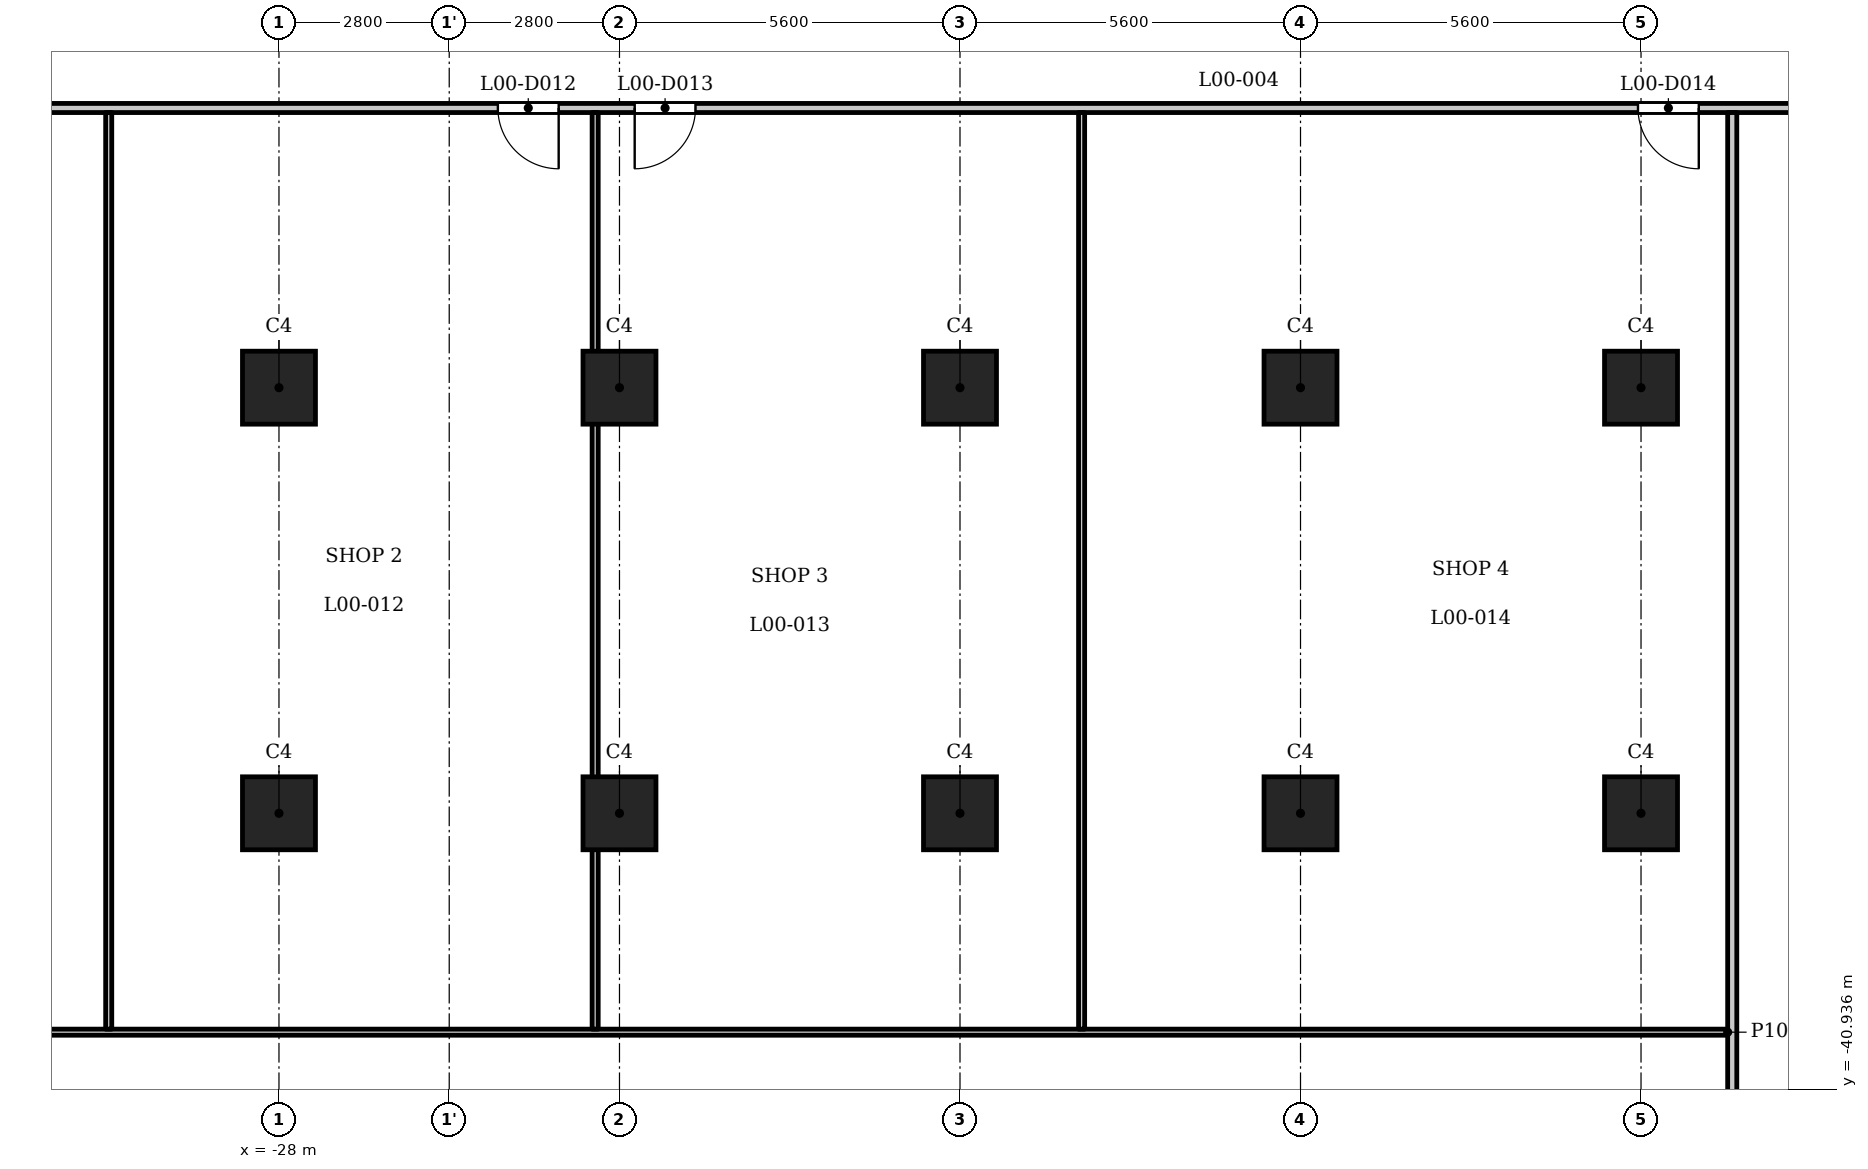
"""IFC4 building model, lengths in metres.
Left out: names, types, materials, properties, quantities, classifications, styles, units other than length and angle.
Written with IfcOpenShell. Run it as: python <this file> out.ifc"""

import sys

from ifc_helpers import new_model, si_unit, direction, frame, frame_2d, origin, origin_2d, place, context, subcontext, project, spatial, rectangle, circle, extrude, element, fill, save


model = new_model("IFC4")
c1 = context("Model", 3, precision=1e-05, world=origin(), true_north=direction((0.0, 1.0)))
c2 = subcontext(c1, "Body", "Model", "MODEL_VIEW")
j1 = project(units=[si_unit("LENGTHUNIT", "METRE"), si_unit("PLANEANGLEUNIT", "RADIAN")], contexts=[c1])
p1 = place(None, origin())
s1 = spatial("IfcSite", under=j1, at=p1, CompositionType="ELEMENT")
p2 = place(p1, origin())
s2 = spatial("IfcBuilding", under=s1, at=p2, CompositionType="ELEMENT")
p3 = place(p2, origin())
s3 = spatial("IfcBuildingStorey", under=s2, at=p3, CompositionType="ELEMENT", Elevation=0.0)
for number, where, z_axis, x_axis in (
    (1, (-28.0, -29.4, 0.0), (0.0, 0.0, 1.0), (1.0, 0.0, 0.0)),
    (2, (-22.4, -29.4, 0.0), (0.0, 0.0, 1.0), (1.0, 0.0, 0.0)),
    (3, (-16.8, -29.4, 0.0), (0.0, 0.0, 1.0), (1.0, 0.0, 0.0)),
    (4, (-11.2, -29.4, 0.0), (0.0, 0.0, 1.0), (1.0, 0.0, 0.0)),
    (5, (-5.6, -29.4, 0.0), (0.0, 0.0, 1.0), (1.0, 0.0, 0.0)),
    (6, (-28.0, -36.4, 0.0), (0.0, 0.0, 1.0), (1.0, 0.0, 0.0)),
    (7, (-22.4, -36.4, 0.0), (0.0, 0.0, 1.0), (1.0, 0.0, 0.0)),
    (8, (-16.8, -36.4, 0.0), (0.0, 0.0, 1.0), (1.0, 0.0, 0.0)),
    (9, (-11.2, -36.4, 0.0), (0.0, 0.0, 1.0), (1.0, 0.0, 0.0)),
    (10, (-5.6, -36.4, 0.0), (0.0, 0.0, 1.0), (1.0, 0.0, 0.0)),
):
    element("IfcColumn", number, at=place(p3, frame(where, z_axis=z_axis, x_axis=x_axis)), inside=s3, PredefinedType="COLUMN", context=c2, shape_type="SweptSolid", body=[
        extrude(circle(Radius=0.6, at=origin_2d()), origin(), (0.0, 0.0, 1.0), 6.5),
    ])
p4 = place(p3, frame((-44.618, -40.0, 0.0), z_axis=(0.0, 0.0, 1.0), x_axis=(1.0, 0.0, 0.0)))
e11 = element("IfcWall", 11, at=p4, inside=s3, PredefinedType="PARTITIONING", context=c2, shape_type="SweptSolid", body=[
    extrude(rectangle(XDim=40.443, YDim=0.1, at=frame_2d((20.221, 0.0))), origin(), (0.0, 0.0, 1.0), 6.15),
])
p5 = place(p3, frame((-37.0, -24.8, 0.0), z_axis=(0.0, 0.0, 1.0), x_axis=(1.0, 0.0, 0.0)))
e12 = element("IfcWall", 12, at=p5, inside=s3, PredefinedType="PARTITIONING", context=c2, shape_type="SweptSolid", body=[
    extrude(rectangle(XDim=34.95, YDim=0.15, at=frame_2d((17.475, 0.0))), origin(), (0.0, 0.0, 1.0), 6.15),
])
p6 = place(p5, frame((0.65, 0.0, 0.0)))
e13 = element("IfcOpeningElement", 13, at=p6, cuts=e12, PredefinedType="OPENING", context=c2, shape_type="SweptSolid", body=[
    extrude(rectangle(XDim=1.0, YDim=2.1, at=frame_2d((0.5, 1.05))), frame((0.0, 0.085, 0.0), z_axis=(0.0, -1.0, 0.0), x_axis=(1.0, 0.0, 0.0)), (0.0, 0.0, 1.0), 0.17),
])
p7 = place(p5, frame((12.6, 0.0, 0.0)))
e14 = element("IfcOpeningElement", 14, at=p7, cuts=e12, PredefinedType="OPENING", context=c2, shape_type="SweptSolid", body=[
    extrude(rectangle(XDim=1.0, YDim=2.1, at=frame_2d((0.5, 1.05))), frame((0.0, 0.085, 0.0), z_axis=(0.0, -1.0, 0.0), x_axis=(1.0, 0.0, 0.0)), (0.0, 0.0, 1.0), 0.17),
])
p8 = place(p5, frame((14.85, 0.0, 0.0)))
e15 = element("IfcOpeningElement", 15, at=p8, cuts=e12, PredefinedType="OPENING", context=c2, shape_type="SweptSolid", body=[
    extrude(rectangle(XDim=1.0, YDim=2.1, at=frame_2d((0.5, 1.05))), frame((0.0, 0.085, 0.0), z_axis=(0.0, -1.0, 0.0), x_axis=(1.0, 0.0, 0.0)), (0.0, 0.0, 1.0), 0.17),
])
p9 = place(p5, frame((31.35, 0.0, 0.0)))
e16 = element("IfcOpeningElement", 16, at=p9, cuts=e12, PredefinedType="OPENING", context=c2, shape_type="SweptSolid", body=[
    extrude(rectangle(XDim=1.0, YDim=2.1, at=frame_2d((0.5, 1.05))), frame((0.0, 0.085, 0.0), z_axis=(0.0, -1.0, 0.0), x_axis=(1.0, 0.0, 0.0)), (0.0, 0.0, 1.0), 0.17),
])
for number, where, z_axis, x_axis in (
    (17, (-30.8, -39.95, 0.0), (0.0, 0.0, 1.0), (0.0, 1.0, 0.0)),
    (18, (-22.8, -39.95, 0.0), (0.0, 0.0, 1.0), (0.0, 1.0, 0.0)),
    (19, (-14.8, -39.95, 0.0), (0.0, 0.0, 1.0), (0.0, 1.0, 0.0)),
):
    element("IfcWall", number, at=place(p3, frame(where, z_axis=z_axis, x_axis=x_axis)), inside=s3, PredefinedType="PARTITIONING", context=c2, shape_type="SweptSolid", body=[
        extrude(rectangle(XDim=15.075, YDim=0.1, at=frame_2d((7.538, 0.0))), origin(), (0.0, 0.0, 1.0), 6.15),
    ])
p10 = place(p3, frame((-4.1, -64.08, 0.0), z_axis=(0.0, 0.0, 1.0), x_axis=(0.0, 1.0, 0.0)))
e20 = element("IfcWall", 20, at=p10, inside=s3, PredefinedType="PARTITIONING", context=c2, shape_type="SweptSolid", body=[
    extrude(rectangle(XDim=39.205, YDim=0.15, at=frame_2d((19.603, 0.0))), origin(), (0.0, 0.0, 1.0), 6.15),
])
p11 = place(p10, frame((0.38, 0.0, 0.0)))
e21 = element("IfcOpeningElement", 21, at=p11, cuts=e20, PredefinedType="OPENING", context=c2, shape_type="SweptSolid", body=[
    extrude(rectangle(XDim=1.8, YDim=2.1, at=frame_2d((0.9, 1.05))), frame((0.0, 0.085, 0.0), z_axis=(0.0, -1.0, 0.0), x_axis=(1.0, 0.0, 0.0)), (0.0, 0.0, 1.0), 0.17),
])
p12 = place(p7, origin())
e22 = element("IfcDoor", 22, at=p12, inside=s3, OperationType="SINGLE_SWING_RIGHT", PredefinedType="DOOR", context=c2, shape_type="SweptSolid", body=[
    extrude(rectangle(XDim=1.0, YDim=2.1, at=frame_2d((0.5, 1.05))), frame((0.0, 0.025, 0.0), z_axis=(0.0, -1.0, 0.0), x_axis=(1.0, 0.0, 0.0)), (0.0, 0.0, 1.0), 0.05),
])
fill(e14, e22)
p13 = place(p8, origin())
e23 = element("IfcDoor", 23, at=p13, inside=s3, OperationType="SINGLE_SWING_LEFT", PredefinedType="DOOR", context=c2, shape_type="SweptSolid", body=[
    extrude(rectangle(XDim=1.0, YDim=2.1, at=frame_2d((0.5, 1.05))), frame((0.0, 0.025, 0.0), z_axis=(0.0, -1.0, 0.0), x_axis=(1.0, 0.0, 0.0)), (0.0, 0.0, 1.0), 0.05),
])
fill(e15, e23)
p14 = place(p9, origin())
e24 = element("IfcDoor", 24, at=p14, inside=s3, OperationType="SINGLE_SWING_RIGHT", PredefinedType="DOOR", context=c2, shape_type="SweptSolid", body=[
    extrude(rectangle(XDim=1.0, YDim=2.1, at=frame_2d((0.5, 1.05))), frame((0.0, 0.025, 0.0), z_axis=(0.0, -1.0, 0.0), x_axis=(1.0, 0.0, 0.0)), (0.0, 0.0, 1.0), 0.05),
])
fill(e16, e24)
save(model, sys.argv[1])
